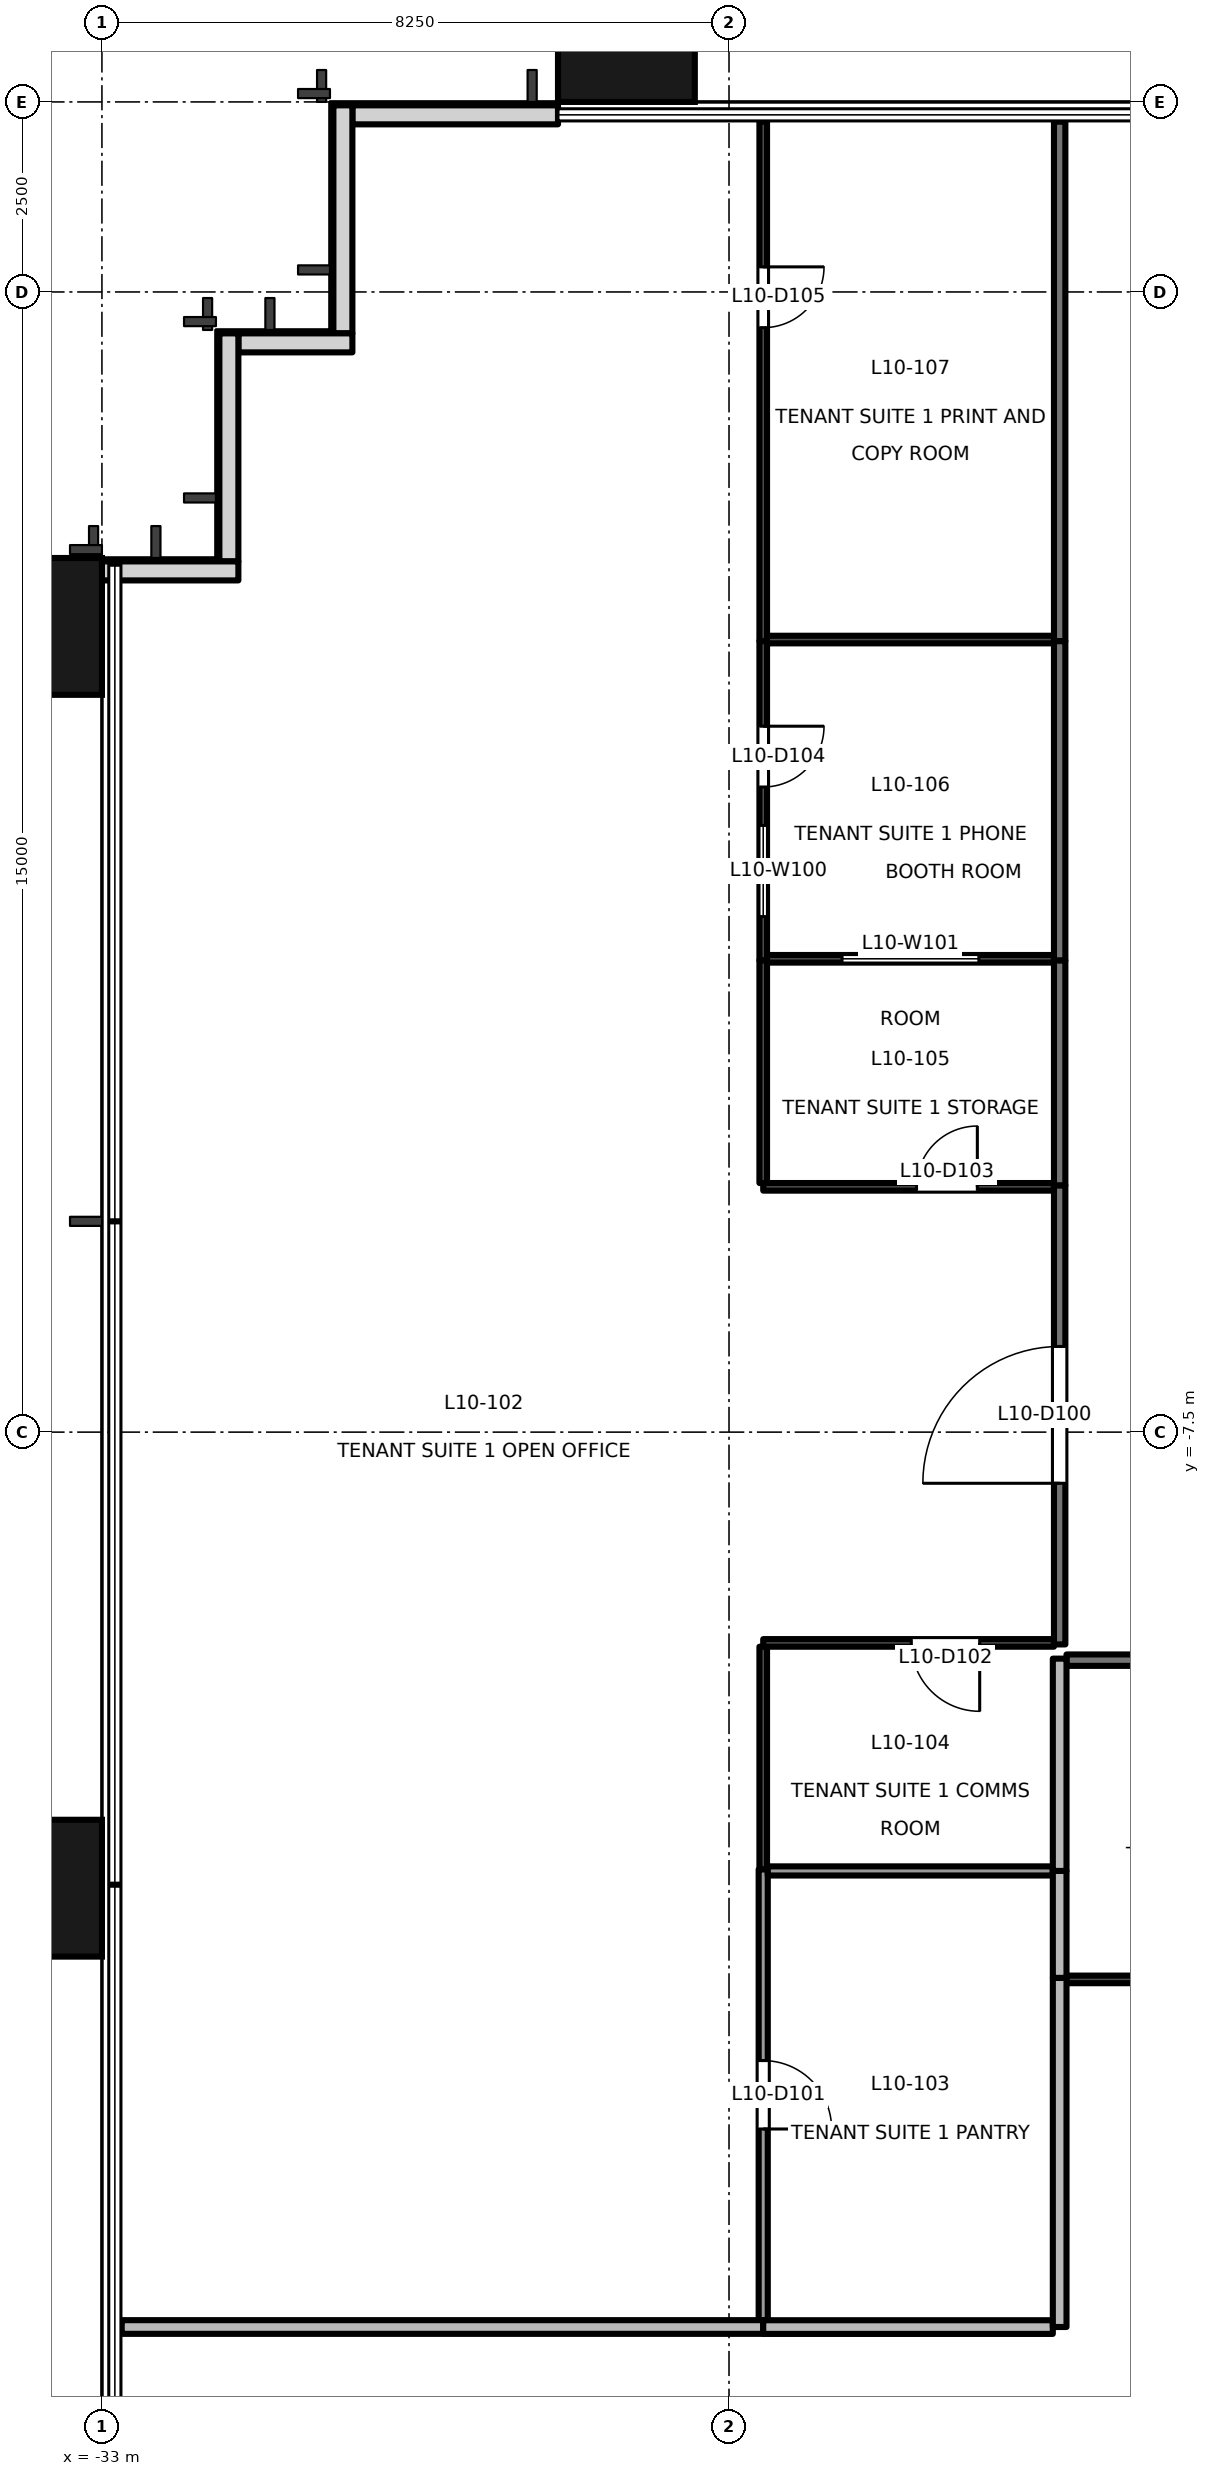
"""IFC4 building model, lengths in metres.
Left out: names, types, materials, properties, quantities, classifications, styles, units other than length and angle.
Written with IfcOpenShell. Run it as: python <this file> out.ifc"""

import sys

from ifc_helpers import new_model, si_unit, direction, frame, frame_2d, origin, origin_2d, place, context, subcontext, project, spatial, rectangle, extrude, element, fill, save


model = new_model("IFC4")
c1 = context("Model", 3, precision=1e-05, world=origin(), true_north=direction((0.0, 1.0)))
c2 = subcontext(c1, "Body", "Model", "MODEL_VIEW")
j1 = project(units=[si_unit("LENGTHUNIT", "METRE"), si_unit("PLANEANGLEUNIT", "RADIAN")], contexts=[c1])
p1 = place(None, origin())
s1 = spatial("IfcSite", under=j1, at=p1, CompositionType="ELEMENT")
p2 = place(p1, origin())
s2 = spatial("IfcBuilding", under=s1, at=p2, CompositionType="ELEMENT")
p3 = place(p2, frame((0.0, 0.0, 48.8)))
s3 = spatial("IfcBuildingStorey", under=s2, at=p3, CompositionType="ELEMENT", Elevation=48.8)
for number, where, z_axis, x_axis in (
    (1, (-33.9, -13.5, -0.2), (0.0, 0.0, 1.0), (0.0, 1.0, 0.0)),
    (2, (-33.9, 3.1, -0.2), (0.0, 0.0, 1.0), (0.0, 1.0, 0.0)),
    (3, (-26.1, 10.9, -0.2), (0.0, 0.0, 1.0), (1.0, 0.0, 0.0)),
):
    element("IfcColumn", number, at=place(p3, frame(where, z_axis=z_axis, x_axis=x_axis)), inside=s3, PredefinedType="COLUMN", context=c2, shape_type="SweptSolid", body=[
        extrude(rectangle(XDim=1.8, YDim=1.8, at=origin_2d()), origin(), (0.0, 0.0, 1.0), 4.1),
    ])
p4 = place(p3, frame((-27.0, 9.83, 0.0), z_axis=(0.0, 0.0, 1.0), x_axis=(-1.0, 0.0, 0.0)))
e4 = element("IfcWall", 4, at=p4, inside=s3, PredefinedType="SOLIDWALL", context=c2, shape_type="SweptSolid", body=[
    extrude(rectangle(XDim=2.705, YDim=0.25, at=frame_2d((1.353, 0.0))), origin(), (0.0, 0.0, 1.0), 3.9),
])
p5 = place(p3, frame((-29.83, 9.955, 0.0), z_axis=(0.0, 0.0, 1.0), x_axis=(0.0, -1.0, 0.0)))
e5 = element("IfcWall", 5, at=p5, inside=s3, PredefinedType="SOLIDWALL", context=c2, shape_type="SweptSolid", body=[
    extrude(rectangle(XDim=3.0, YDim=0.25, at=frame_2d((1.5, 0.0))), origin(), (0.0, 0.0, 1.0), 3.9),
])
p6 = place(p3, frame((-29.705, 6.83, 0.0), z_axis=(0.0, 0.0, 1.0), x_axis=(-1.0, 0.0, 0.0)))
e6 = element("IfcWall", 6, at=p6, inside=s3, PredefinedType="SOLIDWALL", context=c2, shape_type="SweptSolid", body=[
    extrude(rectangle(XDim=1.5, YDim=0.25, at=frame_2d((0.75, 0.0))), origin(), (0.0, 0.0, 1.0), 3.9),
])
p7 = place(p3, frame((-31.33, 6.955, 0.0), z_axis=(0.0, 0.0, 1.0), x_axis=(0.0, -1.0, 0.0)))
e7 = element("IfcWall", 7, at=p7, inside=s3, PredefinedType="SOLIDWALL", context=c2, shape_type="SweptSolid", body=[
    extrude(rectangle(XDim=3.0, YDim=0.25, at=frame_2d((1.5, 0.0))), origin(), (0.0, 0.0, 1.0), 3.9),
])
p8 = place(p3, frame((-31.205, 3.83, 0.0), z_axis=(0.0, 0.0, 1.0), x_axis=(-1.0, 0.0, 0.0)))
e8 = element("IfcWall", 8, at=p8, inside=s3, PredefinedType="SOLIDWALL", context=c2, shape_type="SweptSolid", body=[
    extrude(rectangle(XDim=1.8, YDim=0.25, at=frame_2d((0.9, 0.0))), origin(), (0.0, 0.0, 1.0), 3.9),
])
p9 = place(p3, frame((-20.4, -10.293, 0.0), z_axis=(0.0, 0.0, 1.0), x_axis=(0.0, 1.0, 0.0)))
e9 = element("IfcWall", 9, at=p9, inside=s3, PredefinedType="PARTITIONING", context=c2, shape_type="SweptSolid", body=[
    extrude(rectangle(XDim=6.04, YDim=0.15, at=frame_2d((3.02, 0.0))), origin(), (0.0, 0.0, 1.0), 3.3),
])
p10 = place(p9, frame((2.12, 0.0, 0.0)))
e10 = element("IfcOpeningElement", 10, at=p10, cuts=e9, PredefinedType="OPENING", context=c2, shape_type="SweptSolid", body=[
    extrude(rectangle(XDim=1.8, YDim=2.1, at=frame_2d((0.9, 1.05))), frame((0.0, 0.085, 0.0), z_axis=(0.0, -1.0, 0.0), x_axis=(1.0, 0.0, 0.0)), (0.0, 0.0, 1.0), 0.171),
])
p11 = place(p3, frame((-20.4, -4.253, 0.0), z_axis=(0.0, 0.0, 1.0), x_axis=(0.0, 1.0, 0.0)))
e11 = element("IfcWall", 11, at=p11, inside=s3, PredefinedType="PARTITIONING", context=c2, shape_type="SweptSolid", body=[
    extrude(rectangle(XDim=2.96, YDim=0.15, at=frame_2d((1.48, 0.0))), origin(), (0.0, 0.0, 1.0), 3.9),
])
p12 = place(p3, frame((-20.4, -1.293, 0.0), z_axis=(0.0, 0.0, 1.0), x_axis=(0.0, 1.0, 0.0)))
e12 = element("IfcWall", 12, at=p12, inside=s3, PredefinedType="PARTITIONING", context=c2, shape_type="SweptSolid", body=[
    extrude(rectangle(XDim=4.2, YDim=0.15, at=frame_2d((2.1, 0.0))), origin(), (0.0, 0.0, 1.0), 3.3),
])
p13 = place(p3, frame((-20.4, 2.907, 0.0), z_axis=(0.0, 0.0, 1.0), x_axis=(0.0, 1.0, 0.0)))
e13 = element("IfcWall", 13, at=p13, inside=s3, PredefinedType="PARTITIONING", context=c2, shape_type="SweptSolid", body=[
    extrude(rectangle(XDim=6.833, YDim=0.15, at=frame_2d((3.417, 0.0))), origin(), (0.0, 0.0, 1.0), 3.9),
])
p14 = place(p3, frame((-14.68, -10.5, 0.0), z_axis=(0.0, 0.0, 1.0), x_axis=(-1.0, 0.0, 0.0)))
e14 = element("IfcWall", 14, at=p14, inside=s3, PredefinedType="PARTITIONING", context=c2, shape_type="SweptSolid", body=[
    extrude(rectangle(XDim=5.63, YDim=0.15, at=frame_2d((2.815, 0.0))), origin(), (0.0, 0.0, 1.0), 2.5),
])
p15 = place(p3, frame((-24.3, -13.253, 0.0), z_axis=(0.0, 0.0, 1.0), x_axis=(0.0, -1.0, 0.0)))
e15 = element("IfcWall", 15, at=p15, inside=s3, PredefinedType="PARTITIONING", context=c2, shape_type="SweptSolid", body=[
    extrude(rectangle(XDim=5.93, YDim=0.12, at=frame_2d((2.965, 0.0))), origin(), (0.0, 0.0, 1.0), 3.3),
])
p16 = place(p15, frame((2.515, 0.0, 0.0)))
e16 = element("IfcOpeningElement", 16, at=p16, cuts=e15, PredefinedType="OPENING", context=c2, shape_type="SweptSolid", body=[
    extrude(rectangle(XDim=0.9, YDim=2.1, at=frame_2d((0.45, 1.05))), frame((0.0, 0.071, 0.0), z_axis=(0.0, -1.0, 0.0), x_axis=(1.0, 0.0, 0.0)), (0.0, 0.0, 1.0), 0.141),
])
p17 = place(p3, frame((-24.3, -10.323, 0.0), z_axis=(0.0, 0.0, 1.0), x_axis=(0.0, -1.0, 0.0)))
e17 = element("IfcWall", 17, at=p17, inside=s3, PredefinedType="PARTITIONING", context=c2, shape_type="SweptSolid", body=[
    extrude(rectangle(XDim=2.93, YDim=0.1, at=frame_2d((1.465, 0.0))), origin(), (0.0, 0.0, 1.0), 3.9),
])
p18 = place(p3, frame((-20.475, -10.273, 0.0), z_axis=(0.0, 0.0, 1.0), x_axis=(-1.0, 0.0, 0.0)))
e18 = element("IfcWall", 18, at=p18, inside=s3, PredefinedType="PARTITIONING", context=c2, shape_type="SweptSolid", body=[
    extrude(rectangle(XDim=3.825, YDim=0.1, at=frame_2d((1.913, 0.0))), origin(), (0.0, 0.0, 1.0), 3.9),
])
p19 = place(p18, frame((0.977, 0.0, 0.0)))
e19 = element("IfcOpeningElement", 19, at=p19, cuts=e18, PredefinedType="OPENING", context=c2, shape_type="SweptSolid", body=[
    extrude(rectangle(XDim=0.9, YDim=2.1, at=frame_2d((0.45, 1.05))), frame((0.0, 0.061, 0.0), z_axis=(0.0, -1.0, 0.0), x_axis=(1.0, 0.0, 0.0)), (0.0, 0.0, 1.0), 0.121),
])
p20 = place(p3, frame((-24.3, -1.293, 0.0), z_axis=(0.0, 0.0, 1.0), x_axis=(0.0, -1.0, 0.0)))
e20 = element("IfcWall", 20, at=p20, inside=s3, PredefinedType="PARTITIONING", context=c2, shape_type="SweptSolid", body=[
    extrude(rectangle(XDim=2.93, YDim=0.1, at=frame_2d((1.465, 0.0))), origin(), (0.0, 0.0, 1.0), 3.9),
])
p21 = place(p3, frame((-24.3, -4.273, 0.0), z_axis=(0.0, 0.0, 1.0), x_axis=(1.0, 0.0, 0.0)))
e21 = element("IfcWall", 21, at=p21, inside=s3, PredefinedType="PARTITIONING", context=c2, shape_type="SweptSolid", body=[
    extrude(rectangle(XDim=3.825, YDim=0.1, at=frame_2d((1.913, 0.0))), origin(), (0.0, 0.0, 1.0), 3.9),
])
p22 = place(p21, frame((2.017, 0.0, 0.0)))
e22 = element("IfcOpeningElement", 22, at=p22, cuts=e21, PredefinedType="OPENING", context=c2, shape_type="SweptSolid", body=[
    extrude(rectangle(XDim=0.8, YDim=2.1, at=frame_2d((0.4, 1.05))), frame((0.0, 0.061, 0.0), z_axis=(0.0, -1.0, 0.0), x_axis=(1.0, 0.0, 0.0)), (0.0, 0.0, 1.0), 0.121),
])
p23 = place(p3, frame((-24.3, 2.907, 0.0), z_axis=(0.0, 0.0, 1.0), x_axis=(0.0, -1.0, 0.0)))
e23 = element("IfcWall", 23, at=p23, inside=s3, PredefinedType="PARTITIONING", context=c2, shape_type="SweptSolid", body=[
    extrude(rectangle(XDim=4.2, YDim=0.1, at=frame_2d((2.1, 0.0))), origin(), (0.0, 0.0, 1.0), 3.3),
])
p24 = place(p23, frame((1.12, 0.0, 0.0)))
e24 = element("IfcOpeningElement", 24, at=p24, cuts=e23, PredefinedType="OPENING", context=c2, shape_type="SweptSolid", body=[
    extrude(rectangle(XDim=0.8, YDim=2.1, at=frame_2d((0.4, 1.05))), frame((0.0, 0.061, 0.0), z_axis=(0.0, -1.0, 0.0), x_axis=(1.0, 0.0, 0.0)), (0.0, 0.0, 1.0), 0.121),
])
p25 = place(p23, frame((2.425, 0.0, 0.9)))
e25 = element("IfcOpeningElement", 25, at=p25, cuts=e23, PredefinedType="OPENING", context=c2, shape_type="SweptSolid", body=[
    extrude(rectangle(XDim=1.2, YDim=1.2, at=frame_2d((0.6, 0.6))), frame((0.0, 0.061, 0.0), z_axis=(0.0, -1.0, 0.0), x_axis=(1.0, 0.0, 0.0)), (0.0, 0.0, 1.0), 0.121),
])
p26 = place(p3, frame((-24.3, 9.74, 0.0), z_axis=(0.0, 0.0, 1.0), x_axis=(0.0, -1.0, 0.0)))
e26 = element("IfcWall", 26, at=p26, inside=s3, PredefinedType="PARTITIONING", context=c2, shape_type="SweptSolid", body=[
    extrude(rectangle(XDim=6.833, YDim=0.1, at=frame_2d((3.417, 0.0))), origin(), (0.0, 0.0, 1.0), 3.9),
])
p27 = place(p26, frame((1.91, 0.0, 0.0)))
e27 = element("IfcOpeningElement", 27, at=p27, cuts=e26, PredefinedType="OPENING", context=c2, shape_type="SweptSolid", body=[
    extrude(rectangle(XDim=0.8, YDim=2.1, at=frame_2d((0.4, 1.05))), frame((0.0, 0.061, 0.0), z_axis=(0.0, -1.0, 0.0), x_axis=(1.0, 0.0, 0.0)), (0.0, 0.0, 1.0), 0.121),
])
p28 = place(p3, frame((-24.3, -19.273, 0.0), z_axis=(0.0, 0.0, 1.0), x_axis=(-1.0, 0.0, 0.0)))
e28 = element("IfcWall", 28, at=p28, inside=s3, PredefinedType="PARTITIONING", context=c2, shape_type="SweptSolid", body=[
    extrude(rectangle(XDim=8.44, YDim=0.18, at=frame_2d((4.22, 0.0))), origin(), (0.0, 0.0, 1.0), 3.9),
])
p29 = place(p3, frame((-24.24, -13.273, 0.0), z_axis=(0.0, 0.0, 1.0), x_axis=(1.0, 0.0, 0.0)))
e29 = element("IfcWall", 29, at=p29, inside=s3, PredefinedType="PARTITIONING", context=c2, shape_type="SweptSolid", body=[
    extrude(rectangle(XDim=3.75, YDim=0.12, at=frame_2d((1.875, 0.0))), origin(), (0.0, 0.0, 1.0), 3.9),
])
p30 = place(p3, frame((-20.49, -19.274, 0.0), z_axis=(0.0, 0.0, 1.0), x_axis=(-1.0, 0.0, 0.0)))
e30 = element("IfcWall", 30, at=p30, inside=s3, PredefinedType="PARTITIONING", context=c2, shape_type="SweptSolid", body=[
    extrude(rectangle(XDim=3.81, YDim=0.18, at=frame_2d((1.905, 0.0))), origin(), (0.0, 0.0, 1.0), 3.9),
])
p31 = place(p3, frame((-20.4, -14.68, 0.0), z_axis=(0.0, 0.0, 1.0), x_axis=(0.0, -1.0, 0.0)))
e31 = element("IfcWall", 31, at=p31, inside=s3, PredefinedType="PARTITIONING", context=c2, shape_type="SweptSolid", body=[
    extrude(rectangle(XDim=4.593, YDim=0.18, at=frame_2d((2.296, 0.0))), origin(), (0.0, 0.0, 1.0), 3.3),
])
p32 = place(p3, frame((-20.4, -13.273, 0.0), z_axis=(0.0, 0.0, 1.0), x_axis=(0.0, -1.0, 0.0)))
e32 = element("IfcWall", 32, at=p32, inside=s3, PredefinedType="PARTITIONING", context=c2, shape_type="SweptSolid", body=[
    extrude(rectangle(XDim=1.407, YDim=0.18, at=frame_2d((0.704, 0.0))), origin(), (0.0, 0.0, 1.0), 3.3),
])
p33 = place(p3, frame((-20.4, -10.48, 0.0), z_axis=(0.0, 0.0, 1.0), x_axis=(0.0, -1.0, 0.0)))
e33 = element("IfcWall", 33, at=p33, inside=s3, PredefinedType="PARTITIONING", context=c2, shape_type="SweptSolid", body=[
    extrude(rectangle(XDim=2.793, YDim=0.18, at=frame_2d((1.396, 0.0))), origin(), (0.0, 0.0, 1.0), 3.9),
])
p34 = place(p3, frame((-24.25, -1.273, 0.0), z_axis=(0.0, 0.0, 1.0), x_axis=(1.0, 0.0, 0.0)))
e34 = element("IfcWall", 34, at=p34, inside=s3, PredefinedType="PARTITIONING", context=c2, shape_type="SweptSolid", body=[
    extrude(rectangle(XDim=3.775, YDim=0.1, at=frame_2d((1.887, 0.0))), origin(), (0.0, 0.0, 1.0), 3.9),
])
p35 = place(p34, frame((0.987, 0.0, 0.9)))
e35 = element("IfcOpeningElement", 35, at=p35, cuts=e34, PredefinedType="OPENING", context=c2, shape_type="SweptSolid", body=[
    extrude(rectangle(XDim=1.8, YDim=1.2, at=frame_2d((0.9, 0.6))), frame((0.0, 0.061, 0.0), z_axis=(0.0, -1.0, 0.0), x_axis=(1.0, 0.0, 0.0)), (0.0, 0.0, 1.0), 0.121),
])
p36 = place(p3, frame((-24.25, 2.927, 0.0), z_axis=(0.0, 0.0, 1.0), x_axis=(1.0, 0.0, 0.0)))
e36 = element("IfcWall", 36, at=p36, inside=s3, PredefinedType="PARTITIONING", context=c2, shape_type="SweptSolid", body=[
    extrude(rectangle(XDim=3.775, YDim=0.1, at=frame_2d((1.887, 0.0))), origin(), (0.0, 0.0, 1.0), 3.9),
])
p37 = place(p3, frame((-20.31, -14.7, 0.0), z_axis=(0.0, 0.0, 1.0), x_axis=(1.0, 0.0, 0.0)))
e37 = element("IfcWall", 37, at=p37, inside=s3, PredefinedType="PARTITIONING", context=c2, shape_type="SweptSolid", body=[
    extrude(rectangle(XDim=5.65, YDim=0.1, at=frame_2d((2.825, 0.0))), origin(), (0.0, 0.0, 1.0), 2.5),
])
p38 = place(p37, frame((3.225, 0.0, 0.0)))
e38 = element("IfcOpeningElement", 38, at=p38, cuts=e37, PredefinedType="OPENING", context=c2, shape_type="SweptSolid", body=[
    extrude(rectangle(XDim=0.9, YDim=2.1, at=frame_2d((0.45, 1.05))), frame((0.0, 0.061, 0.0), z_axis=(0.0, -1.0, 0.0), x_axis=(1.0, 0.0, 0.0)), (0.0, 0.0, 1.0), 0.121),
])
p39 = place(p10, origin())
e39 = element("IfcDoor", 39, at=p39, inside=s3, OperationType="DOUBLE_DOOR_SINGLE_SWING", PredefinedType="DOOR", context=c2, shape_type="SweptSolid", body=[
    extrude(rectangle(XDim=1.8, YDim=2.1, at=frame_2d((0.9, 1.05))), frame((0.0, 0.025, 0.0), z_axis=(0.0, -1.0, 0.0), x_axis=(1.0, 0.0, 0.0)), (0.0, 0.0, 1.0), 0.05),
])
fill(e10, e39)
p40 = place(p16, origin())
e40 = element("IfcDoor", 40, at=p40, inside=s3, OperationType="SINGLE_SWING_RIGHT", PredefinedType="DOOR", context=c2, shape_type="SweptSolid", body=[
    extrude(rectangle(XDim=0.9, YDim=2.1, at=frame_2d((0.45, 1.05))), frame((0.0, 0.025, 0.0), z_axis=(0.0, -1.0, 0.0), x_axis=(1.0, 0.0, 0.0)), (0.0, 0.0, 1.0), 0.05),
])
fill(e16, e40)
p41 = place(p19, origin())
e41 = element("IfcDoor", 41, at=p41, inside=s3, OperationType="SINGLE_SWING_LEFT", PredefinedType="DOOR", context=c2, shape_type="SweptSolid", body=[
    extrude(rectangle(XDim=0.9, YDim=2.1, at=frame_2d((0.45, 1.05))), frame((0.0, 0.025, 0.0), z_axis=(0.0, -1.0, 0.0), x_axis=(1.0, 0.0, 0.0)), (0.0, 0.0, 1.0), 0.05),
])
fill(e19, e41)
p42 = place(p22, origin())
e42 = element("IfcDoor", 42, at=p42, inside=s3, OperationType="SINGLE_SWING_RIGHT", PredefinedType="DOOR", context=c2, shape_type="SweptSolid", body=[
    extrude(rectangle(XDim=0.8, YDim=2.1, at=frame_2d((0.4, 1.05))), frame((0.0, 0.025, 0.0), z_axis=(0.0, -1.0, 0.0), x_axis=(1.0, 0.0, 0.0)), (0.0, 0.0, 1.0), 0.05),
])
fill(e22, e42)
p43 = place(p24, origin())
e43 = element("IfcDoor", 43, at=p43, inside=s3, OperationType="SINGLE_SWING_LEFT", PredefinedType="DOOR", context=c2, shape_type="SweptSolid", body=[
    extrude(rectangle(XDim=0.8, YDim=2.1, at=frame_2d((0.4, 1.05))), frame((0.0, 0.025, 0.0), z_axis=(0.0, -1.0, 0.0), x_axis=(1.0, 0.0, 0.0)), (0.0, 0.0, 1.0), 0.05),
])
fill(e24, e43)
p44 = place(p27, origin())
e44 = element("IfcDoor", 44, at=p44, inside=s3, OperationType="SINGLE_SWING_LEFT", PredefinedType="DOOR", context=c2, shape_type="SweptSolid", body=[
    extrude(rectangle(XDim=0.8, YDim=2.1, at=frame_2d((0.4, 1.05))), frame((0.0, 0.025, 0.0), z_axis=(0.0, -1.0, 0.0), x_axis=(1.0, 0.0, 0.0)), (0.0, 0.0, 1.0), 0.05),
])
fill(e27, e44)
p45 = place(p25, origin())
e45 = element("IfcWindow", 45, at=p45, inside=s3, PartitioningType="SINGLE_PANEL", PredefinedType="WINDOW", context=c2, shape_type="SweptSolid", body=[
    extrude(rectangle(XDim=1.2, YDim=1.2, at=frame_2d((0.6, 0.6))), frame((0.0, 0.03, 0.0), z_axis=(0.0, -1.0, 0.0), x_axis=(1.0, 0.0, 0.0)), (0.0, 0.0, 1.0), 0.06),
])
fill(e25, e45)
p46 = place(p35, origin())
e46 = element("IfcWindow", 46, at=p46, inside=s3, PartitioningType="SINGLE_PANEL", PredefinedType="WINDOW", context=c2, shape_type="SweptSolid", body=[
    extrude(rectangle(XDim=1.8, YDim=1.2, at=frame_2d((0.9, 0.6))), frame((0.0, 0.03, 0.0), z_axis=(0.0, -1.0, 0.0), x_axis=(1.0, 0.0, 0.0)), (0.0, 0.0, 1.0), 0.06),
])
fill(e35, e46)
save(model, sys.argv[1])
